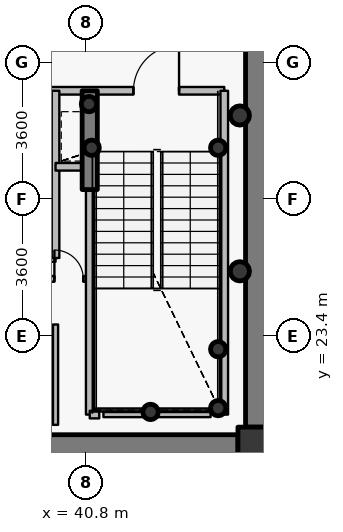
"""IFC4 building model, lengths in metres.
Left out: names, types, materials, properties, quantities, classifications, styles, units other than length and angle.
Written with IfcOpenShell. Run it as: python <this file> out.ifc"""

import sys

from ifc_helpers import new_model, si_unit, direction, frame, frame_2d, origin, origin_2d, place, context, subcontext, project, spatial, rectangle, hollow_circle, extrude, source, transform, mapped, element, fill, save


model = new_model("IFC4")
c1 = context("Model", 3, precision=1e-05, world=origin(), true_north=direction((0.0, 1.0)))
c2 = subcontext(c1, "Body", "Model", "MODEL_VIEW")
j1 = project(units=[si_unit("LENGTHUNIT", "METRE"), si_unit("PLANEANGLEUNIT", "RADIAN")], contexts=[c1])
p1 = place(None, origin())
s1 = spatial("IfcSite", under=j1, at=p1, CompositionType="ELEMENT")
p2 = place(p1, origin())
s2 = spatial("IfcBuilding", under=s1, at=p2, CompositionType="ELEMENT")
p3 = place(p2, frame((0.0, 0.0, 201.15)))
s3 = spatial("IfcBuildingStorey", under=s2, at=p3, CompositionType="ELEMENT", Elevation=201.15)
p4 = place(p3, frame((45.4, 20.4, 0.0), z_axis=(0.0, 0.0, 1.0), x_axis=(1.0, 0.0, 0.0)))
e1 = element("IfcColumn", 1, at=p4, inside=s3, PredefinedType="COLUMN", context=c2, shape_type="SweptSolid", body=[
    extrude(rectangle(XDim=1.2, YDim=1.2, at=origin_2d()), origin(), (0.0, 0.0, 1.0), 3.75),
])
for number, where, z_axis, x_axis in (
    (2, (44.28, 21.5, 0.0), (0.0, 0.0, 1.0), (1.0, 0.0, 0.0)),
    (3, (44.28, 23.05, 0.0), (0.0, 0.0, 1.0), (1.0, 0.0, 0.0)),
    (4, (42.5, 21.4, 0.0), (0.0, 0.0, 1.0), (1.0, 0.0, 0.0)),
    (5, (40.95, 28.35, 0.0), (0.0, 0.0, 1.0), (1.0, 0.0, 0.0)),
    (6, (44.28, 28.35, 0.0), (0.0, 0.0, 1.0), (1.0, 0.0, 0.0)),
    (7, (40.88, 29.5, 0.0), (0.0, 0.0, 1.0), (1.0, 0.0, 0.0)),
):
    element("IfcColumn", number, at=place(p3, frame(where, z_axis=z_axis, x_axis=x_axis)), inside=s3, PredefinedType="COLUMN", context=c2, shape_type="SweptSolid", body=[
        extrude(hollow_circle(Radius=0.203, WallThickness=0.016, at=origin_2d()), origin(), (0.0, 0.0, 1.0), 3.75),
    ])
p5 = place(p3, frame((45.4, 33.0, 0.0), z_axis=(0.0, 0.0, 1.0), x_axis=(0.0, -1.0, 0.0)))
e8 = element("IfcWall", 8, at=p5, inside=s3, PredefinedType="SHEAR", context=c2, shape_type="SweptSolid", body=[
    extrude(rectangle(XDim=12.0, YDim=0.8, at=frame_2d((6.0, 0.0))), origin(), (0.0, 0.0, 1.0), 2.9),
])
p6 = place(p3, frame((44.8, 20.4, 0.0), z_axis=(0.0, 0.0, 1.0), x_axis=(-1.0, 0.0, 0.0)))
e9 = element("IfcWall", 9, at=p6, inside=s3, PredefinedType="SHEAR", context=c2, shape_type="SweptSolid", body=[
    extrude(rectangle(XDim=17.6, YDim=0.8, at=frame_2d((8.8, 0.0))), origin(), (0.0, 0.0, 1.0), 2.9),
])
p7 = place(p6, frame((9.55, 0.0, 0.0)))
e10 = element("IfcOpeningElement", 10, at=p7, cuts=e9, PredefinedType="OPENING", context=c2, shape_type="SweptSolid", body=[
    extrude(rectangle(XDim=1.15, YDim=2.15, at=origin_2d()), frame((0.575, 0.41, 1.075), z_axis=(0.0, -1.0, 0.0), x_axis=(1.0, 0.0, 0.0)), (0.0, 0.0, 1.0), 0.82),
])
p8 = place(p3, frame((40.9, 27.25, 0.0), z_axis=(0.0, 0.0, 1.0), x_axis=(0.0, 1.0, 0.0)))
e11 = element("IfcWall", 11, at=p8, inside=s3, PredefinedType="SHEAR", context=c2, shape_type="SweptSolid", body=[
    extrude(rectangle(XDim=2.6, YDim=0.4, at=frame_2d((1.3, 0.0))), origin(), (0.0, 0.0, 1.0), 3.05),
])
for number, where, z_axis, x_axis in (
    (12, (44.85, 25.1, 0.0), (0.0, 0.0, 1.0), (1.0, 0.0, 0.0)),
    (13, (44.85, 29.2, 0.0), (0.0, 0.0, 1.0), (1.0, 0.0, 0.0)),
):
    element("IfcColumn", number, at=place(p3, frame(where, z_axis=z_axis, x_axis=x_axis)), inside=s3, PredefinedType="COLUMN", context=c2, shape_type="SweptSolid", body=[
        extrude(hollow_circle(Radius=0.254, WallThickness=0.02, at=origin_2d()), origin(), (0.0, 0.0, 1.0), 3.75),
    ])
p9 = place(p3, frame((35.05, 27.25, 0.0), z_axis=(0.0, 0.0, 1.0), x_axis=(1.0, 0.0, 0.0)))
e14 = element("IfcWall", 14, at=p9, inside=s3, PredefinedType="PARTITIONING", context=c2, shape_type="SweptSolid", body=[
    extrude(rectangle(XDim=4.95, YDim=0.2, at=frame_2d((2.475, 0.0))), origin(), (0.0, 0.0, 1.0), 3.035),
])
p10 = place(p3, frame((35.45, 25.45, 0.0), z_axis=(0.0, 0.0, 1.0), x_axis=(1.0, 0.0, 0.0)))
e15 = element("IfcWall", 15, at=p10, inside=s3, PredefinedType="PARTITIONING", context=c2, shape_type="SweptSolid", body=[
    extrude(rectangle(XDim=4.55, YDim=0.2, at=frame_2d((2.275, 0.0))), origin(), (0.0, 0.0, 1.0), 3.035),
])
p11 = place(p3, frame((35.95, 29.85, 0.0), z_axis=(0.0, 0.0, 1.0), x_axis=(1.0, 0.0, 0.0)))
e16 = element("IfcWall", 16, at=p11, inside=s3, PredefinedType="PARTITIONING", context=c2, shape_type="SweptSolid", body=[
    extrude(rectangle(XDim=8.49, YDim=0.2, at=frame_2d((4.245, 0.0))), origin(), (0.0, 0.0, 1.0), 3.035),
])
p12 = place(p11, frame((6.1, 0.0, 0.0)))
e17 = element("IfcOpeningElement", 17, at=p12, cuts=e16, PredefinedType="OPENING", context=c2, shape_type="SweptSolid", body=[
    extrude(rectangle(XDim=1.2, YDim=2.15, at=origin_2d()), frame((0.6, 0.11, 1.075), z_axis=(0.0, -1.0, 0.0), x_axis=(1.0, 0.0, 0.0)), (0.0, 0.0, 1.0), 0.22),
])
p13 = place(p11, frame((0.37, 0.0, 0.0)))
e18 = element("IfcOpeningElement", 18, at=p13, cuts=e16, PredefinedType="OPENING", context=c2, shape_type="SweptSolid", body=[
    extrude(rectangle(XDim=1.15, YDim=2.15, at=origin_2d()), frame((0.575, 0.11, 1.075), z_axis=(0.0, -1.0, 0.0), x_axis=(1.0, 0.0, 0.0)), (0.0, 0.0, 1.0), 0.22),
])
p14 = place(p11, frame((2.425, 0.0, 0.0)))
e19 = element("IfcOpeningElement", 19, at=p14, cuts=e16, PredefinedType="OPENING", context=c2, shape_type="SweptSolid", body=[
    extrude(rectangle(XDim=1.05, YDim=2.15, at=origin_2d()), frame((0.525, 0.11, 1.075), z_axis=(0.0, -1.0, 0.0), x_axis=(1.0, 0.0, 0.0)), (0.0, 0.0, 1.0), 0.22),
])
p15 = place(p3, frame((39.8, 24.9, 0.0), z_axis=(0.0, 0.0, 1.0), x_axis=(1.0, 0.0, 0.0)))
e20 = element("IfcWall", 20, at=p15, inside=s3, PredefinedType="PARTITIONING", context=c2, shape_type="SweptSolid", body=[
    extrude(rectangle(XDim=1.1, YDim=0.15, at=frame_2d((0.55, 0.0))), origin(), (0.0, 0.0, 1.0), 3.45),
])
p16 = place(p15, frame((0.17, 0.0, 0.0)))
e21 = element("IfcOpeningElement", 21, at=p16, cuts=e20, PredefinedType="OPENING", context=c2, shape_type="SweptSolid", body=[
    extrude(rectangle(XDim=0.76, YDim=2.1, at=origin_2d()), frame((0.38, 0.085, 1.05), z_axis=(0.0, -1.0, 0.0), x_axis=(1.0, 0.0, 0.0)), (0.0, 0.0, 1.0), 0.17),
])
p17 = place(p3, frame((40.0, 25.45, 0.0), z_axis=(0.0, 0.0, 1.0), x_axis=(0.0, 1.0, 0.0)))
e22 = element("IfcWall", 22, at=p17, inside=s3, PredefinedType="PARTITIONING", context=c2, shape_type="SweptSolid", body=[
    extrude(rectangle(XDim=4.4, YDim=0.2, at=frame_2d((2.2, 0.0))), origin(), (0.0, 0.0, 1.0), 3.45),
])
p18 = place(p3, frame((40.0, 27.85, 0.0), z_axis=(0.0, 0.0, 1.0), x_axis=(1.0, 0.0, 0.0)))
e23 = element("IfcWall", 23, at=p18, inside=s3, PredefinedType="PARTITIONING", context=c2, shape_type="SweptSolid", body=[
    extrude(rectangle(XDim=0.9, YDim=0.2, at=frame_2d((0.45, 0.0))), origin(), (0.0, 0.0, 1.0), 3.45),
])
p19 = place(p3, frame((40.9, 21.33, 0.0), z_axis=(0.0, 0.0, 1.0), x_axis=(0.0, 1.0, 0.0)))
e24 = element("IfcWall", 24, at=p19, inside=s3, PredefinedType="PARTITIONING", context=c2, shape_type="SweptSolid", body=[
    extrude(rectangle(XDim=5.91, YDim=0.2, at=frame_2d((2.955, 0.0))), origin(), (0.0, 0.0, 1.0), 2.985),
])
p20 = place(p3, frame((40.9, 21.33, 0.0), z_axis=(0.0, 0.0, 1.0), x_axis=(1.0, 0.0, 0.0)))
e25 = element("IfcWall", 25, at=p20, inside=s3, PredefinedType="PARTITIONING", context=c2, shape_type="SweptSolid", body=[
    extrude(rectangle(XDim=0.25, YDim=0.2, at=frame_2d((0.125, 0.0))), origin(), (0.0, 0.0, 1.0), 2.985),
])
p21 = place(p3, frame((44.44, 21.33, 0.0), z_axis=(0.0, 0.0, 1.0), x_axis=(0.0, 1.0, 0.0)))
e26 = element("IfcWall", 26, at=p21, inside=s3, PredefinedType="PARTITIONING", context=c2, shape_type="SweptSolid", body=[
    extrude(rectangle(XDim=8.52, YDim=0.2, at=frame_2d((4.26, 0.0))), origin(), (0.0, 0.0, 1.0), 3.45),
])
p22 = place(p3, frame((44.08, 21.33, 0.0), z_axis=(0.0, 0.0, 1.0), x_axis=(-1.0, 0.0, 0.0)))
e27 = element("IfcWall", 27, at=p22, inside=s3, PredefinedType="PARTITIONING", context=c2, shape_type="SweptSolid", body=[
    extrude(rectangle(XDim=2.82, YDim=0.135, at=frame_2d((1.41, 0.0))), origin(), (0.0, 0.0, 1.0), 2.985),
])
p23 = place(p3, frame((40.0, 23.7, 0.0), z_axis=(0.0, 0.0, 1.0), x_axis=(0.0, -1.0, 0.0)))
e28 = element("IfcWall", 28, at=p23, inside=s3, PredefinedType="PARTITIONING", context=c2, shape_type="SweptSolid", body=[
    extrude(rectangle(XDim=2.64, YDim=0.135, at=frame_2d((1.32, 0.0))), origin(), (0.0, 0.0, 1.0), 2.985),
])
m1 = source(origin(), c2, "Body", "SweptSolid", [
    extrude(rectangle(XDim=1.2, YDim=2.15, at=origin_2d()), frame((0.6, 0.025, 1.075), z_axis=(0.0, -1.0, 0.0), x_axis=(1.0, 0.0, 0.0)), (0.0, 0.0, 1.0), 0.05),
])
p24 = place(p12, origin())
e29 = element("IfcDoor", 29, at=p24, inside=s3, OperationType="SINGLE_SWING_RIGHT", PredefinedType="DOOR", context=c2, shape_type="MappedRepresentation", body=[
    mapped(m1, transform((0.0, 0.0, 0.0), x_axis=(1.0, 0.0, 0.0), y_axis=(0.0, 1.0, 0.0), z_axis=(0.0, 0.0, 1.0), scale=1.0)),
])
fill(e17, e29)
m2 = source(origin(), c2, "Body", "SweptSolid", [
    extrude(rectangle(XDim=0.76, YDim=2.1, at=origin_2d()), frame((0.38, 0.025, 1.05), z_axis=(0.0, -1.0, 0.0), x_axis=(1.0, 0.0, 0.0)), (0.0, 0.0, 1.0), 0.05),
])
p25 = place(p16, origin())
e30 = element("IfcDoor", 30, at=p25, inside=s3, OperationType="SINGLE_SWING_LEFT", PredefinedType="DOOR", context=c2, shape_type="MappedRepresentation", body=[
    mapped(m2, transform((0.0, 0.0, 0.0), x_axis=(1.0, 0.0, 0.0), y_axis=(0.0, 1.0, 0.0), z_axis=(0.0, 0.0, 1.0), scale=1.0)),
])
fill(e21, e30)
save(model, sys.argv[1])
